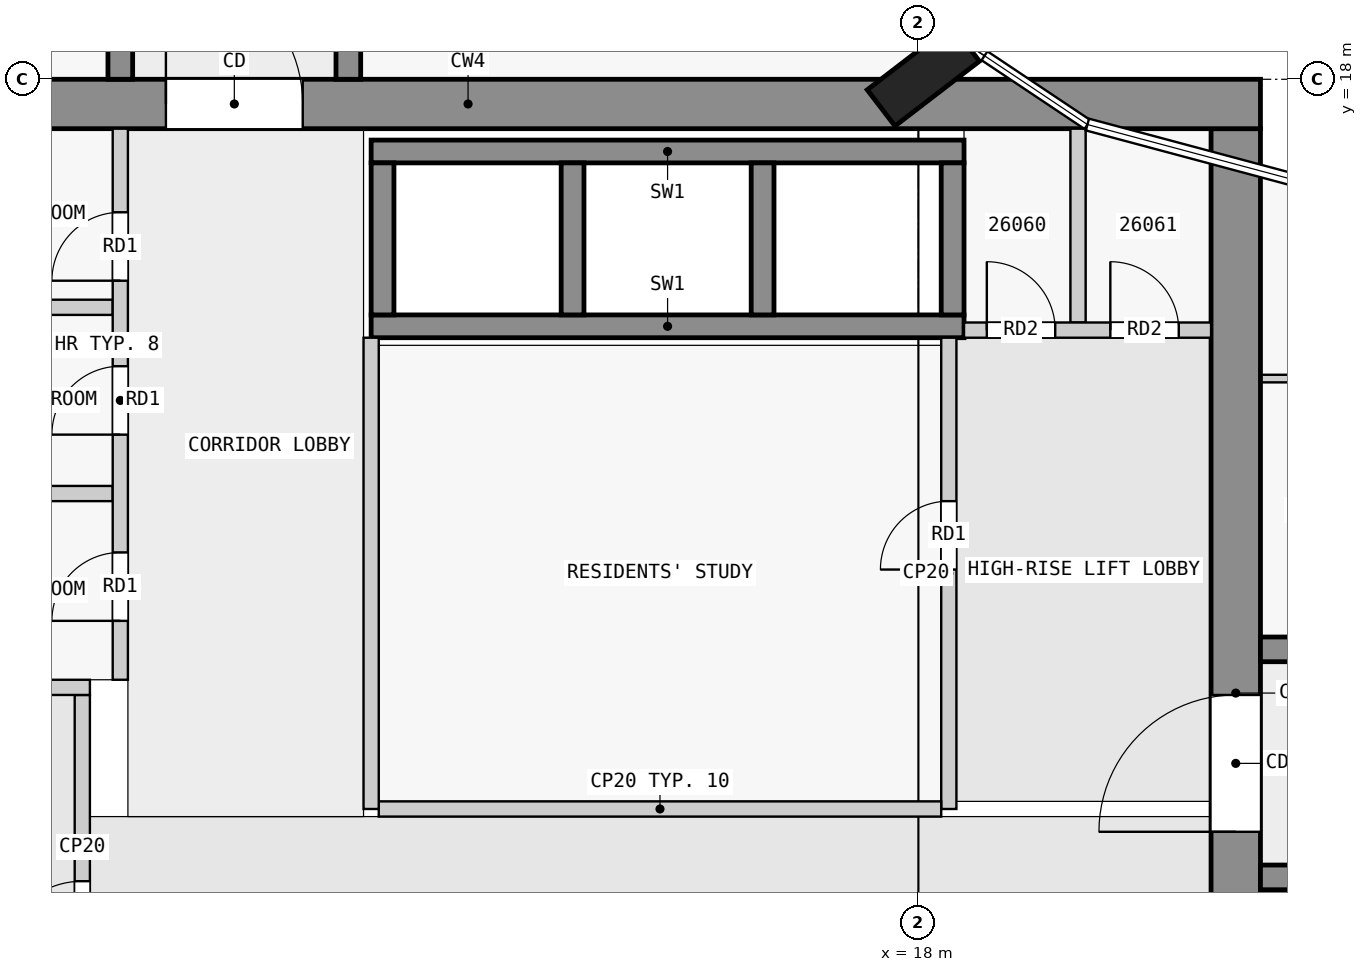
"""IFC4 building model, lengths in metres.
Left out: names, types, materials, properties, quantities, classifications, styles, units other than length and angle.
Written with IfcOpenShell. Run it as: python <this file> out.ifc"""

import sys

from ifc_helpers import new_model, si_unit, direction, frame, frame_2d, origin, origin_2d, place, context, subcontext, project, spatial, rectangle, extrude, element, fill, save


model = new_model("IFC4")
c1 = context("Model", 3, precision=1e-05, world=origin(), true_north=direction((0.0, 1.0)))
c2 = subcontext(c1, "Body", "Model", "MODEL_VIEW")
j1 = project(units=[si_unit("LENGTHUNIT", "METRE"), si_unit("PLANEANGLEUNIT", "RADIAN")], contexts=[c1])
p1 = place(None, origin())
s1 = spatial("IfcSite", under=j1, at=p1, CompositionType="ELEMENT")
p2 = place(p1, origin())
s2 = spatial("IfcBuilding", under=s1, at=p2, CompositionType="ELEMENT")
p3 = place(p2, frame((0.0, 0.0, 102.8)))
s3 = spatial("IfcBuildingStorey", under=s2, at=p3, CompositionType="ELEMENT", Elevation=102.8)
p4 = place(p3, frame((18.065, 18.05, 0.0), z_axis=(0.0, 0.0, 1.0), x_axis=(-0.608810846443, 0.793315418515, 0.0)))
e1 = element("IfcColumn", 1, at=p4, inside=s3, PredefinedType="COLUMN", context=c2, shape_type="SweptSolid", body=[
    extrude(rectangle(XDim=0.6, YDim=1.4, at=origin_2d()), origin(), (0.0, 0.0, 1.0), 3.5),
])
p5 = place(p3, frame((1.65, 17.675, 0.0), z_axis=(0.0, 0.0, 1.0), x_axis=(1.0, 0.0, 0.0)))
e2 = element("IfcWall", 2, at=p5, inside=s3, PredefinedType="SHEAR", context=c2, shape_type="SweptSolid", body=[
    extrude(rectangle(XDim=20.85, YDim=0.65, at=frame_2d((10.425, 0.0))), origin(), (0.0, 0.0, 1.0), 3.25),
])
p6 = place(p5, frame((6.45, 0.0, 0.0)))
e3 = element("IfcOpeningElement", 3, at=p6, cuts=e2, PredefinedType="OPENING", context=c2, shape_type="SweptSolid", body=[
    extrude(rectangle(XDim=1.8, YDim=2.1, at=frame_2d((0.9, 1.05))), frame((0.0, 0.335, 0.0), z_axis=(0.0, -1.0, 0.0), x_axis=(1.0, 0.0, 0.0)), (0.0, 0.0, 1.0), 0.67),
])
p7 = place(p3, frame((22.175, 2.5, 0.0), z_axis=(0.0, 0.0, 1.0), x_axis=(0.0, 1.0, 0.0)))
e4 = element("IfcWall", 4, at=p7, inside=s3, PredefinedType="SHEAR", context=c2, shape_type="SweptSolid", body=[
    extrude(rectangle(XDim=14.85, YDim=0.65, at=frame_2d((7.425, 0.0))), origin(), (0.0, 0.0, 1.0), 3.25),
])
p8 = place(p7, frame((5.6, 0.0, 0.0)))
e5 = element("IfcOpeningElement", 5, at=p8, cuts=e4, PredefinedType="OPENING", context=c2, shape_type="SweptSolid", body=[
    extrude(rectangle(XDim=1.8, YDim=2.1, at=frame_2d((0.9, 1.05))), frame((0.0, 0.335, 0.0), z_axis=(0.0, -1.0, 0.0), x_axis=(1.0, 0.0, 0.0)), (0.0, 0.0, 1.0), 0.67),
])
for number, where, z_axis, x_axis in (
    (6, (10.8, 17.05, 0.0), (0.0, 0.0, 1.0), (1.0, 0.0, 0.0)),
    (7, (10.8, 14.75, 0.0), (0.0, 0.0, 1.0), (1.0, 0.0, 0.0)),
):
    element("IfcWall", number, at=place(p3, frame(where, z_axis=z_axis, x_axis=x_axis)), inside=s3, PredefinedType="SHEAR", context=c2, shape_type="SweptSolid", body=[
        extrude(rectangle(XDim=7.8, YDim=0.3, at=frame_2d((3.9, 0.0))), origin(), (0.0, 0.0, 1.0), 3.25),
    ])
for number, where, z_axis, x_axis in (
    (8, (10.95, 14.9, 0.0), (0.0, 0.0, 1.0), (0.0, 1.0, 0.0)),
    (9, (13.45, 14.9, 0.0), (0.0, 0.0, 1.0), (0.0, 1.0, 0.0)),
    (10, (15.95, 14.9, 0.0), (0.0, 0.0, 1.0), (0.0, 1.0, 0.0)),
    (11, (18.45, 14.9, 0.0), (0.0, 0.0, 1.0), (0.0, 1.0, 0.0)),
):
    element("IfcWall", number, at=place(p3, frame(where, z_axis=z_axis, x_axis=x_axis)), inside=s3, PredefinedType="SHEAR", context=c2, shape_type="SweptSolid", body=[
        extrude(rectangle(XDim=2.0, YDim=0.3, at=frame_2d((1.0, 0.0))), origin(), (0.0, 0.0, 1.0), 3.25),
    ])
p9 = place(p3, frame((22.5, 7.5, 0.0), z_axis=(0.0, 0.0, 1.0), x_axis=(1.0, 0.0, 0.0)))
e12 = element("IfcWall", 12, at=p9, inside=s3, PredefinedType="SHEAR", context=c2, shape_type="SweptSolid", body=[
    extrude(rectangle(XDim=22.5, YDim=0.325, at=frame_2d((11.25, 0.0))), origin(), (0.0, 0.0, 1.0), 3.25),
])
p10 = place(p9, frame((4.05, 0.0, 0.0)))
e13 = element("IfcOpeningElement", 13, at=p10, cuts=e12, PredefinedType="OPENING", context=c2, shape_type="SweptSolid", body=[
    extrude(rectangle(XDim=1.0, YDim=2.1, at=frame_2d((0.5, 1.05))), frame((0.0, 0.172, 0.0), z_axis=(0.0, -1.0, 0.0), x_axis=(1.0, 0.0, 0.0)), (0.0, 0.0, 1.0), 0.345),
])
p11 = place(p9, frame((10.75, 0.0, 0.0)))
e14 = element("IfcOpeningElement", 14, at=p11, cuts=e12, PredefinedType="OPENING", context=c2, shape_type="SweptSolid", body=[
    extrude(rectangle(XDim=1.0, YDim=2.1, at=frame_2d((0.5, 1.05))), frame((0.0, 0.172, 0.0), z_axis=(0.0, -1.0, 0.0), x_axis=(1.0, 0.0, 0.0)), (0.0, 0.0, 1.0), 0.345),
])
p12 = place(p9, frame((16.85, 0.0, 0.0)))
e15 = element("IfcOpeningElement", 15, at=p12, cuts=e12, PredefinedType="OPENING", context=c2, shape_type="SweptSolid", body=[
    extrude(rectangle(XDim=1.0, YDim=2.1, at=frame_2d((0.5, 1.05))), frame((0.0, 0.172, 0.0), z_axis=(0.0, -1.0, 0.0), x_axis=(1.0, 0.0, 0.0)), (0.0, 0.0, 1.0), 0.345),
])
p13 = place(p3, frame((22.5, 10.5, 0.0), z_axis=(0.0, 0.0, 1.0), x_axis=(1.0, 0.0, 0.0)))
e16 = element("IfcWall", 16, at=p13, inside=s3, PredefinedType="SHEAR", context=c2, shape_type="SweptSolid", body=[
    extrude(rectangle(XDim=22.5, YDim=0.325, at=frame_2d((11.25, 0.0))), origin(), (0.0, 0.0, 1.0), 3.25),
])
p14 = place(p13, frame((1.75, 0.0, 0.0)))
e17 = element("IfcOpeningElement", 17, at=p14, cuts=e16, PredefinedType="OPENING", context=c2, shape_type="SweptSolid", body=[
    extrude(rectangle(XDim=1.0, YDim=2.1, at=frame_2d((0.5, 1.05))), frame((0.0, 0.172, 0.0), z_axis=(0.0, -1.0, 0.0), x_axis=(1.0, 0.0, 0.0)), (0.0, 0.0, 1.0), 0.345),
])
p15 = place(p13, frame((6.25, 0.0, 0.0)))
e18 = element("IfcOpeningElement", 18, at=p15, cuts=e16, PredefinedType="OPENING", context=c2, shape_type="SweptSolid", body=[
    extrude(rectangle(XDim=1.0, YDim=2.1, at=frame_2d((0.5, 1.05))), frame((0.0, 0.172, 0.0), z_axis=(0.0, -1.0, 0.0), x_axis=(1.0, 0.0, 0.0)), (0.0, 0.0, 1.0), 0.345),
])
p16 = place(p13, frame((10.85, 0.0, 0.0)))
e19 = element("IfcOpeningElement", 19, at=p16, cuts=e16, PredefinedType="OPENING", context=c2, shape_type="SweptSolid", body=[
    extrude(rectangle(XDim=0.9, YDim=2.1, at=frame_2d((0.45, 1.05))), frame((0.0, 0.172, 0.0), z_axis=(0.0, -1.0, 0.0), x_axis=(1.0, 0.0, 0.0)), (0.0, 0.0, 1.0), 0.345),
])
p17 = place(p13, frame((15.25, 0.0, 0.0)))
e20 = element("IfcOpeningElement", 20, at=p17, cuts=e16, PredefinedType="OPENING", context=c2, shape_type="SweptSolid", body=[
    extrude(rectangle(XDim=1.0, YDim=2.1, at=frame_2d((0.5, 1.05))), frame((0.0, 0.172, 0.0), z_axis=(0.0, -1.0, 0.0), x_axis=(1.0, 0.0, 0.0)), (0.0, 0.0, 1.0), 0.345),
])
p18 = place(p13, frame((18.75, 0.0, 0.0)))
e21 = element("IfcOpeningElement", 21, at=p18, cuts=e16, PredefinedType="OPENING", context=c2, shape_type="SweptSolid", body=[
    extrude(rectangle(XDim=0.9, YDim=2.1, at=frame_2d((0.45, 1.05))), frame((0.0, 0.172, 0.0), z_axis=(0.0, -1.0, 0.0), x_axis=(1.0, 0.0, 0.0)), (0.0, 0.0, 1.0), 0.345),
])
p19 = place(p13, frame((20.95, 0.0, 0.0)))
e22 = element("IfcOpeningElement", 22, at=p19, cuts=e16, PredefinedType="OPENING", context=c2, shape_type="SweptSolid", body=[
    extrude(rectangle(XDim=1.0, YDim=2.1, at=frame_2d((0.5, 1.05))), frame((0.0, 0.172, 0.0), z_axis=(0.0, -1.0, 0.0), x_axis=(1.0, 0.0, 0.0)), (0.0, 0.0, 1.0), 0.345),
])
p20 = place(p3, frame((7.5, 18.0, 0.0), z_axis=(0.0, 0.0, 1.0), x_axis=(0.0, 1.0, 0.0)))
e23 = element("IfcWall", 23, at=p20, inside=s3, PredefinedType="SHEAR", context=c2, shape_type="SweptSolid", body=[
    extrude(rectangle(XDim=27.0, YDim=0.325, at=frame_2d((13.5, 0.0))), origin(), (0.0, 0.0, 1.0), 3.25),
])
p21 = place(p20, frame((1.75, 0.0, 0.0)))
e24 = element("IfcOpeningElement", 24, at=p21, cuts=e23, PredefinedType="OPENING", context=c2, shape_type="SweptSolid", body=[
    extrude(rectangle(XDim=1.0, YDim=2.1, at=frame_2d((0.5, 1.05))), frame((0.0, 0.172, 0.0), z_axis=(0.0, -1.0, 0.0), x_axis=(1.0, 0.0, 0.0)), (0.0, 0.0, 1.0), 0.345),
])
p22 = place(p20, frame((6.25, 0.0, 0.0)))
e25 = element("IfcOpeningElement", 25, at=p22, cuts=e23, PredefinedType="OPENING", context=c2, shape_type="SweptSolid", body=[
    extrude(rectangle(XDim=1.0, YDim=2.1, at=frame_2d((0.5, 1.05))), frame((0.0, 0.172, 0.0), z_axis=(0.0, -1.0, 0.0), x_axis=(1.0, 0.0, 0.0)), (0.0, 0.0, 1.0), 0.345),
])
p23 = place(p20, frame((10.75, 0.0, 0.0)))
e26 = element("IfcOpeningElement", 26, at=p23, cuts=e23, PredefinedType="OPENING", context=c2, shape_type="SweptSolid", body=[
    extrude(rectangle(XDim=1.0, YDim=2.1, at=frame_2d((0.5, 1.05))), frame((0.0, 0.172, 0.0), z_axis=(0.0, -1.0, 0.0), x_axis=(1.0, 0.0, 0.0)), (0.0, 0.0, 1.0), 0.345),
])
p24 = place(p20, frame((15.25, 0.0, 0.0)))
e27 = element("IfcOpeningElement", 27, at=p24, cuts=e23, PredefinedType="OPENING", context=c2, shape_type="SweptSolid", body=[
    extrude(rectangle(XDim=1.0, YDim=2.1, at=frame_2d((0.5, 1.05))), frame((0.0, 0.172, 0.0), z_axis=(0.0, -1.0, 0.0), x_axis=(1.0, 0.0, 0.0)), (0.0, 0.0, 1.0), 0.345),
])
p25 = place(p20, frame((19.75, 0.0, 0.0)))
e28 = element("IfcOpeningElement", 28, at=p25, cuts=e23, PredefinedType="OPENING", context=c2, shape_type="SweptSolid", body=[
    extrude(rectangle(XDim=1.0, YDim=2.1, at=frame_2d((0.5, 1.05))), frame((0.0, 0.172, 0.0), z_axis=(0.0, -1.0, 0.0), x_axis=(1.0, 0.0, 0.0)), (0.0, 0.0, 1.0), 0.345),
])
p26 = place(p20, frame((23.25, 0.0, 0.0)))
e29 = element("IfcOpeningElement", 29, at=p26, cuts=e23, PredefinedType="OPENING", context=c2, shape_type="SweptSolid", body=[
    extrude(rectangle(XDim=0.9, YDim=2.1, at=frame_2d((0.45, 1.05))), frame((0.0, 0.172, 0.0), z_axis=(0.0, -1.0, 0.0), x_axis=(1.0, 0.0, 0.0)), (0.0, 0.0, 1.0), 0.345),
])
p27 = place(p20, frame((25.45, 0.0, 0.0)))
e30 = element("IfcOpeningElement", 30, at=p27, cuts=e23, PredefinedType="OPENING", context=c2, shape_type="SweptSolid", body=[
    extrude(rectangle(XDim=1.0, YDim=2.1, at=frame_2d((0.5, 1.05))), frame((0.0, 0.172, 0.0), z_axis=(0.0, -1.0, 0.0), x_axis=(1.0, 0.0, 0.0)), (0.0, 0.0, 1.0), 0.345),
])
p28 = place(p3, frame((10.5, 18.0, 0.0), z_axis=(0.0, 0.0, 1.0), x_axis=(0.0, 1.0, 0.0)))
e31 = element("IfcWall", 31, at=p28, inside=s3, PredefinedType="SHEAR", context=c2, shape_type="SweptSolid", body=[
    extrude(rectangle(XDim=27.0, YDim=0.325, at=frame_2d((13.5, 0.0))), origin(), (0.0, 0.0, 1.0), 3.25),
])
p29 = place(p28, frame((1.75, 0.0, 0.0)))
e32 = element("IfcOpeningElement", 32, at=p29, cuts=e31, PredefinedType="OPENING", context=c2, shape_type="SweptSolid", body=[
    extrude(rectangle(XDim=1.0, YDim=2.1, at=frame_2d((0.5, 1.05))), frame((0.0, 0.172, 0.0), z_axis=(0.0, -1.0, 0.0), x_axis=(1.0, 0.0, 0.0)), (0.0, 0.0, 1.0), 0.345),
])
p30 = place(p28, frame((6.25, 0.0, 0.0)))
e33 = element("IfcOpeningElement", 33, at=p30, cuts=e31, PredefinedType="OPENING", context=c2, shape_type="SweptSolid", body=[
    extrude(rectangle(XDim=1.0, YDim=2.1, at=frame_2d((0.5, 1.05))), frame((0.0, 0.172, 0.0), z_axis=(0.0, -1.0, 0.0), x_axis=(1.0, 0.0, 0.0)), (0.0, 0.0, 1.0), 0.345),
])
p31 = place(p28, frame((13.05, 0.0, 0.0)))
e34 = element("IfcOpeningElement", 34, at=p31, cuts=e31, PredefinedType="OPENING", context=c2, shape_type="SweptSolid", body=[
    extrude(rectangle(XDim=1.0, YDim=2.1, at=frame_2d((0.5, 1.05))), frame((0.0, 0.172, 0.0), z_axis=(0.0, -1.0, 0.0), x_axis=(1.0, 0.0, 0.0)), (0.0, 0.0, 1.0), 0.345),
])
p32 = place(p28, frame((21.35, 0.0, 0.0)))
e35 = element("IfcOpeningElement", 35, at=p32, cuts=e31, PredefinedType="OPENING", context=c2, shape_type="SweptSolid", body=[
    extrude(rectangle(XDim=1.0, YDim=2.1, at=frame_2d((0.5, 1.05))), frame((0.0, 0.172, 0.0), z_axis=(0.0, -1.0, 0.0), x_axis=(1.0, 0.0, 0.0)), (0.0, 0.0, 1.0), 0.345),
])
p33 = place(p3, frame((7.0, 5.9, 0.0), z_axis=(0.0, 0.0, 1.0), x_axis=(0.0, 1.0, 0.0)))
e36 = element("IfcWall", 36, at=p33, inside=s3, PredefinedType="PARTITIONING", context=c2, shape_type="SweptSolid", body=[
    extrude(rectangle(XDim=4.0, YDim=0.2, at=frame_2d((2.0, 0.0))), origin(), (0.0, 0.0, 1.0), 3.25),
])
p34 = place(p33, frame((0.45, 0.0, 0.0)))
e37 = element("IfcOpeningElement", 37, at=p34, cuts=e36, PredefinedType="OPENING", context=c2, shape_type="SweptSolid", body=[
    extrude(rectangle(XDim=1.1, YDim=2.1, at=frame_2d((0.55, 1.05))), frame((0.0, 0.11, 0.0), z_axis=(0.0, -1.0, 0.0), x_axis=(1.0, 0.0, 0.0)), (0.0, 0.0, 1.0), 0.22),
])
p35 = place(p3, frame((5.15, 10.0, 0.0), z_axis=(0.0, 0.0, 1.0), x_axis=(1.0, 0.0, 0.0)))
e38 = element("IfcWall", 38, at=p35, inside=s3, PredefinedType="PARTITIONING", context=c2, shape_type="SweptSolid", body=[
    extrude(rectangle(XDim=1.95, YDim=0.2, at=frame_2d((0.975, 0.0))), origin(), (0.0, 0.0, 1.0), 3.25),
])
p36 = place(p3, frame((10.8, 8.4, 0.0), z_axis=(0.0, 0.0, 1.0), x_axis=(0.0, 1.0, 0.0)))
e39 = element("IfcWall", 39, at=p36, inside=s3, PredefinedType="PARTITIONING", context=c2, shape_type="SweptSolid", body=[
    extrude(rectangle(XDim=6.2, YDim=0.2, at=frame_2d((3.1, 0.0))), origin(), (0.0, 0.0, 1.0), 3.25),
])
p37 = place(p3, frame((10.9, 8.4, 0.0), z_axis=(0.0, 0.0, 1.0), x_axis=(1.0, 0.0, 0.0)))
e40 = element("IfcWall", 40, at=p37, inside=s3, PredefinedType="PARTITIONING", context=c2, shape_type="SweptSolid", body=[
    extrude(rectangle(XDim=7.4, YDim=0.2, at=frame_2d((3.7, 0.0))), origin(), (0.0, 0.0, 1.0), 3.25),
])
p38 = place(p3, frame((18.4, 8.4, 0.0), z_axis=(0.0, 0.0, 1.0), x_axis=(0.0, 1.0, 0.0)))
e41 = element("IfcWall", 41, at=p38, inside=s3, PredefinedType="PARTITIONING", context=c2, shape_type="SweptSolid", body=[
    extrude(rectangle(XDim=6.2, YDim=0.2, at=frame_2d((3.1, 0.0))), origin(), (0.0, 0.0, 1.0), 3.25),
])
p39 = place(p38, frame((3.15, 0.0, 0.0)))
e42 = element("IfcOpeningElement", 42, at=p39, cuts=e41, PredefinedType="OPENING", context=c2, shape_type="SweptSolid", body=[
    extrude(rectangle(XDim=0.9, YDim=2.1, at=frame_2d((0.45, 1.05))), frame((0.0, 0.11, 0.0), z_axis=(0.0, -1.0, 0.0), x_axis=(1.0, 0.0, 0.0)), (0.0, 0.0, 1.0), 0.22),
])
p40 = place(p3, frame((7.5, 10.1, 0.0), z_axis=(0.0, 0.0, 1.0), x_axis=(0.0, 1.0, 0.0)))
e43 = element("IfcWall", 43, at=p40, inside=s3, PredefinedType="PARTITIONING", context=c2, shape_type="SweptSolid", body=[
    extrude(rectangle(XDim=7.25, YDim=0.2, at=frame_2d((3.625, 0.0))), origin(), (0.0, 0.0, 1.0), 3.25),
])
p41 = place(p40, frame((0.775, 0.0, 0.0)))
e44 = element("IfcOpeningElement", 44, at=p41, cuts=e43, PredefinedType="OPENING", context=c2, shape_type="SweptSolid", body=[
    extrude(rectangle(XDim=0.9, YDim=2.1, at=frame_2d((0.45, 1.05))), frame((0.0, 0.11, 0.0), z_axis=(0.0, -1.0, 0.0), x_axis=(1.0, 0.0, 0.0)), (0.0, 0.0, 1.0), 0.22),
])
p42 = place(p40, frame((3.225, 0.0, 0.0)))
e45 = element("IfcOpeningElement", 45, at=p42, cuts=e43, PredefinedType="OPENING", context=c2, shape_type="SweptSolid", body=[
    extrude(rectangle(XDim=0.9, YDim=2.1, at=frame_2d((0.45, 1.05))), frame((0.0, 0.11, 0.0), z_axis=(0.0, -1.0, 0.0), x_axis=(1.0, 0.0, 0.0)), (0.0, 0.0, 1.0), 0.22),
])
p43 = place(p40, frame((5.25, 0.0, 0.0)))
e46 = element("IfcOpeningElement", 46, at=p43, cuts=e43, PredefinedType="OPENING", context=c2, shape_type="SweptSolid", body=[
    extrude(rectangle(XDim=0.9, YDim=2.1, at=frame_2d((0.45, 1.05))), frame((0.0, 0.11, 0.0), z_axis=(0.0, -1.0, 0.0), x_axis=(1.0, 0.0, 0.0)), (0.0, 0.0, 1.0), 0.22),
])
for number, where, z_axis, x_axis in (
    (47, (5.15, 12.55, 0.0), (0.0, 0.0, 1.0), (1.0, 0.0, 0.0)),
    (48, (5.15, 15.0, 0.0), (0.0, 0.0, 1.0), (1.0, 0.0, 0.0)),
):
    element("IfcWall", number, at=place(p3, frame(where, z_axis=z_axis, x_axis=x_axis)), inside=s3, PredefinedType="PARTITIONING", context=c2, shape_type="SweptSolid", body=[
        extrude(rectangle(XDim=2.25, YDim=0.2, at=frame_2d((1.125, 0.0))), origin(), (0.0, 0.0, 1.0), 3.25),
    ])
p44 = place(p3, frame((18.6, 14.7, 0.0), z_axis=(0.0, 0.0, 1.0), x_axis=(1.0, 0.0, 0.0)))
e49 = element("IfcWall", 49, at=p44, inside=s3, PredefinedType="PARTITIONING", context=c2, shape_type="SweptSolid", body=[
    extrude(rectangle(XDim=3.25, YDim=0.2, at=frame_2d((1.625, 0.0))), origin(), (0.0, 0.0, 1.0), 3.25),
])
p45 = place(p44, frame((0.3, 0.0, 0.0)))
e50 = element("IfcOpeningElement", 50, at=p45, cuts=e49, PredefinedType="OPENING", context=c2, shape_type="SweptSolid", body=[
    extrude(rectangle(XDim=0.9, YDim=2.1, at=frame_2d((0.45, 1.05))), frame((0.0, 0.11, 0.0), z_axis=(0.0, -1.0, 0.0), x_axis=(1.0, 0.0, 0.0)), (0.0, 0.0, 1.0), 0.22),
])
p46 = place(p44, frame((1.925, 0.0, 0.0)))
e51 = element("IfcOpeningElement", 51, at=p46, cuts=e49, PredefinedType="OPENING", context=c2, shape_type="SweptSolid", body=[
    extrude(rectangle(XDim=0.9, YDim=2.1, at=frame_2d((0.45, 1.05))), frame((0.0, 0.11, 0.0), z_axis=(0.0, -1.0, 0.0), x_axis=(1.0, 0.0, 0.0)), (0.0, 0.0, 1.0), 0.22),
])
p47 = place(p3, frame((20.1, 14.8, 0.0), z_axis=(0.0, 0.0, 1.0), x_axis=(0.0, 1.0, 0.0)))
e52 = element("IfcWall", 52, at=p47, inside=s3, PredefinedType="PARTITIONING", context=c2, shape_type="SweptSolid", body=[
    extrude(rectangle(XDim=2.55, YDim=0.2, at=frame_2d((1.275, 0.0))), origin(), (0.0, 0.0, 1.0), 3.25),
])
p48 = place(p3, frame((23.95, 14.062, 0.0), z_axis=(0.0, 0.0, 1.0), x_axis=(-1.0, 0.0, 0.0)))
e53 = element("IfcWall", 53, at=p48, inside=s3, PredefinedType="PARTITIONING", context=c2, shape_type="SweptSolid", body=[
    extrude(rectangle(XDim=1.45, YDim=0.1, at=frame_2d((0.725, 0.0))), origin(), (0.0, 0.0, 1.0), 3.25),
])
p49 = place(p34, origin())
e54 = element("IfcDoor", 54, at=p49, inside=s3, OperationType="SINGLE_SWING_LEFT", PredefinedType="DOOR", context=c2, shape_type="SweptSolid", body=[
    extrude(rectangle(XDim=1.1, YDim=2.1, at=frame_2d((0.55, 1.05))), frame((0.0, 0.025, 0.0), z_axis=(0.0, -1.0, 0.0), x_axis=(1.0, 0.0, 0.0)), (0.0, 0.0, 1.0), 0.05),
])
fill(e37, e54)
p50 = place(p39, origin())
e55 = element("IfcDoor", 55, at=p50, inside=s3, OperationType="SINGLE_SWING_LEFT", PredefinedType="DOOR", context=c2, shape_type="SweptSolid", body=[
    extrude(rectangle(XDim=0.9, YDim=2.1, at=frame_2d((0.45, 1.05))), frame((0.0, 0.025, 0.0), z_axis=(0.0, -1.0, 0.0), x_axis=(1.0, 0.0, 0.0)), (0.0, 0.0, 1.0), 0.05),
])
fill(e42, e55)
p51 = place(p8, origin())
e56 = element("IfcDoor", 56, at=p51, inside=s3, OperationType="DOUBLE_DOOR_SINGLE_SWING", PredefinedType="DOOR", context=c2, shape_type="SweptSolid", body=[
    extrude(rectangle(XDim=1.8, YDim=2.1, at=frame_2d((0.9, 1.05))), frame((0.0, 0.025, 0.0), z_axis=(0.0, -1.0, 0.0), x_axis=(1.0, 0.0, 0.0)), (0.0, 0.0, 1.0), 0.05),
])
fill(e5, e56)
p52 = place(p6, origin())
e57 = element("IfcDoor", 57, at=p52, inside=s3, OperationType="DOUBLE_DOOR_SINGLE_SWING", PredefinedType="DOOR", context=c2, shape_type="SweptSolid", body=[
    extrude(rectangle(XDim=1.8, YDim=2.1, at=frame_2d((0.9, 1.05))), frame((0.0, 0.025, 0.0), z_axis=(0.0, -1.0, 0.0), x_axis=(1.0, 0.0, 0.0)), (0.0, 0.0, 1.0), 0.05),
])
fill(e3, e57)
p53 = place(p41, origin())
e58 = element("IfcDoor", 58, at=p53, inside=s3, OperationType="SINGLE_SWING_RIGHT", PredefinedType="DOOR", context=c2, shape_type="SweptSolid", body=[
    extrude(rectangle(XDim=0.9, YDim=2.1, at=frame_2d((0.45, 1.05))), frame((0.0, 0.025, 0.0), z_axis=(0.0, -1.0, 0.0), x_axis=(1.0, 0.0, 0.0)), (0.0, 0.0, 1.0), 0.05),
])
fill(e44, e58)
p54 = place(p42, origin())
e59 = element("IfcDoor", 59, at=p54, inside=s3, OperationType="SINGLE_SWING_RIGHT", PredefinedType="DOOR", context=c2, shape_type="SweptSolid", body=[
    extrude(rectangle(XDim=0.9, YDim=2.1, at=frame_2d((0.45, 1.05))), frame((0.0, 0.025, 0.0), z_axis=(0.0, -1.0, 0.0), x_axis=(1.0, 0.0, 0.0)), (0.0, 0.0, 1.0), 0.05),
])
fill(e45, e59)
p55 = place(p43, origin())
e60 = element("IfcDoor", 60, at=p55, inside=s3, OperationType="SINGLE_SWING_RIGHT", PredefinedType="DOOR", context=c2, shape_type="SweptSolid", body=[
    extrude(rectangle(XDim=0.9, YDim=2.1, at=frame_2d((0.45, 1.05))), frame((0.0, 0.025, 0.0), z_axis=(0.0, -1.0, 0.0), x_axis=(1.0, 0.0, 0.0)), (0.0, 0.0, 1.0), 0.05),
])
fill(e46, e60)
p56 = place(p45, origin())
e61 = element("IfcDoor", 61, at=p56, inside=s3, OperationType="SINGLE_SWING_LEFT", PredefinedType="DOOR", context=c2, shape_type="SweptSolid", body=[
    extrude(rectangle(XDim=0.9, YDim=2.1, at=frame_2d((0.45, 1.05))), frame((0.0, 0.025, 0.0), z_axis=(0.0, -1.0, 0.0), x_axis=(1.0, 0.0, 0.0)), (0.0, 0.0, 1.0), 0.05),
])
fill(e50, e61)
p57 = place(p46, origin())
e62 = element("IfcDoor", 62, at=p57, inside=s3, OperationType="SINGLE_SWING_LEFT", PredefinedType="DOOR", context=c2, shape_type="SweptSolid", body=[
    extrude(rectangle(XDim=0.9, YDim=2.1, at=frame_2d((0.45, 1.05))), frame((0.0, 0.025, 0.0), z_axis=(0.0, -1.0, 0.0), x_axis=(1.0, 0.0, 0.0)), (0.0, 0.0, 1.0), 0.05),
])
fill(e51, e62)
save(model, sys.argv[1])
